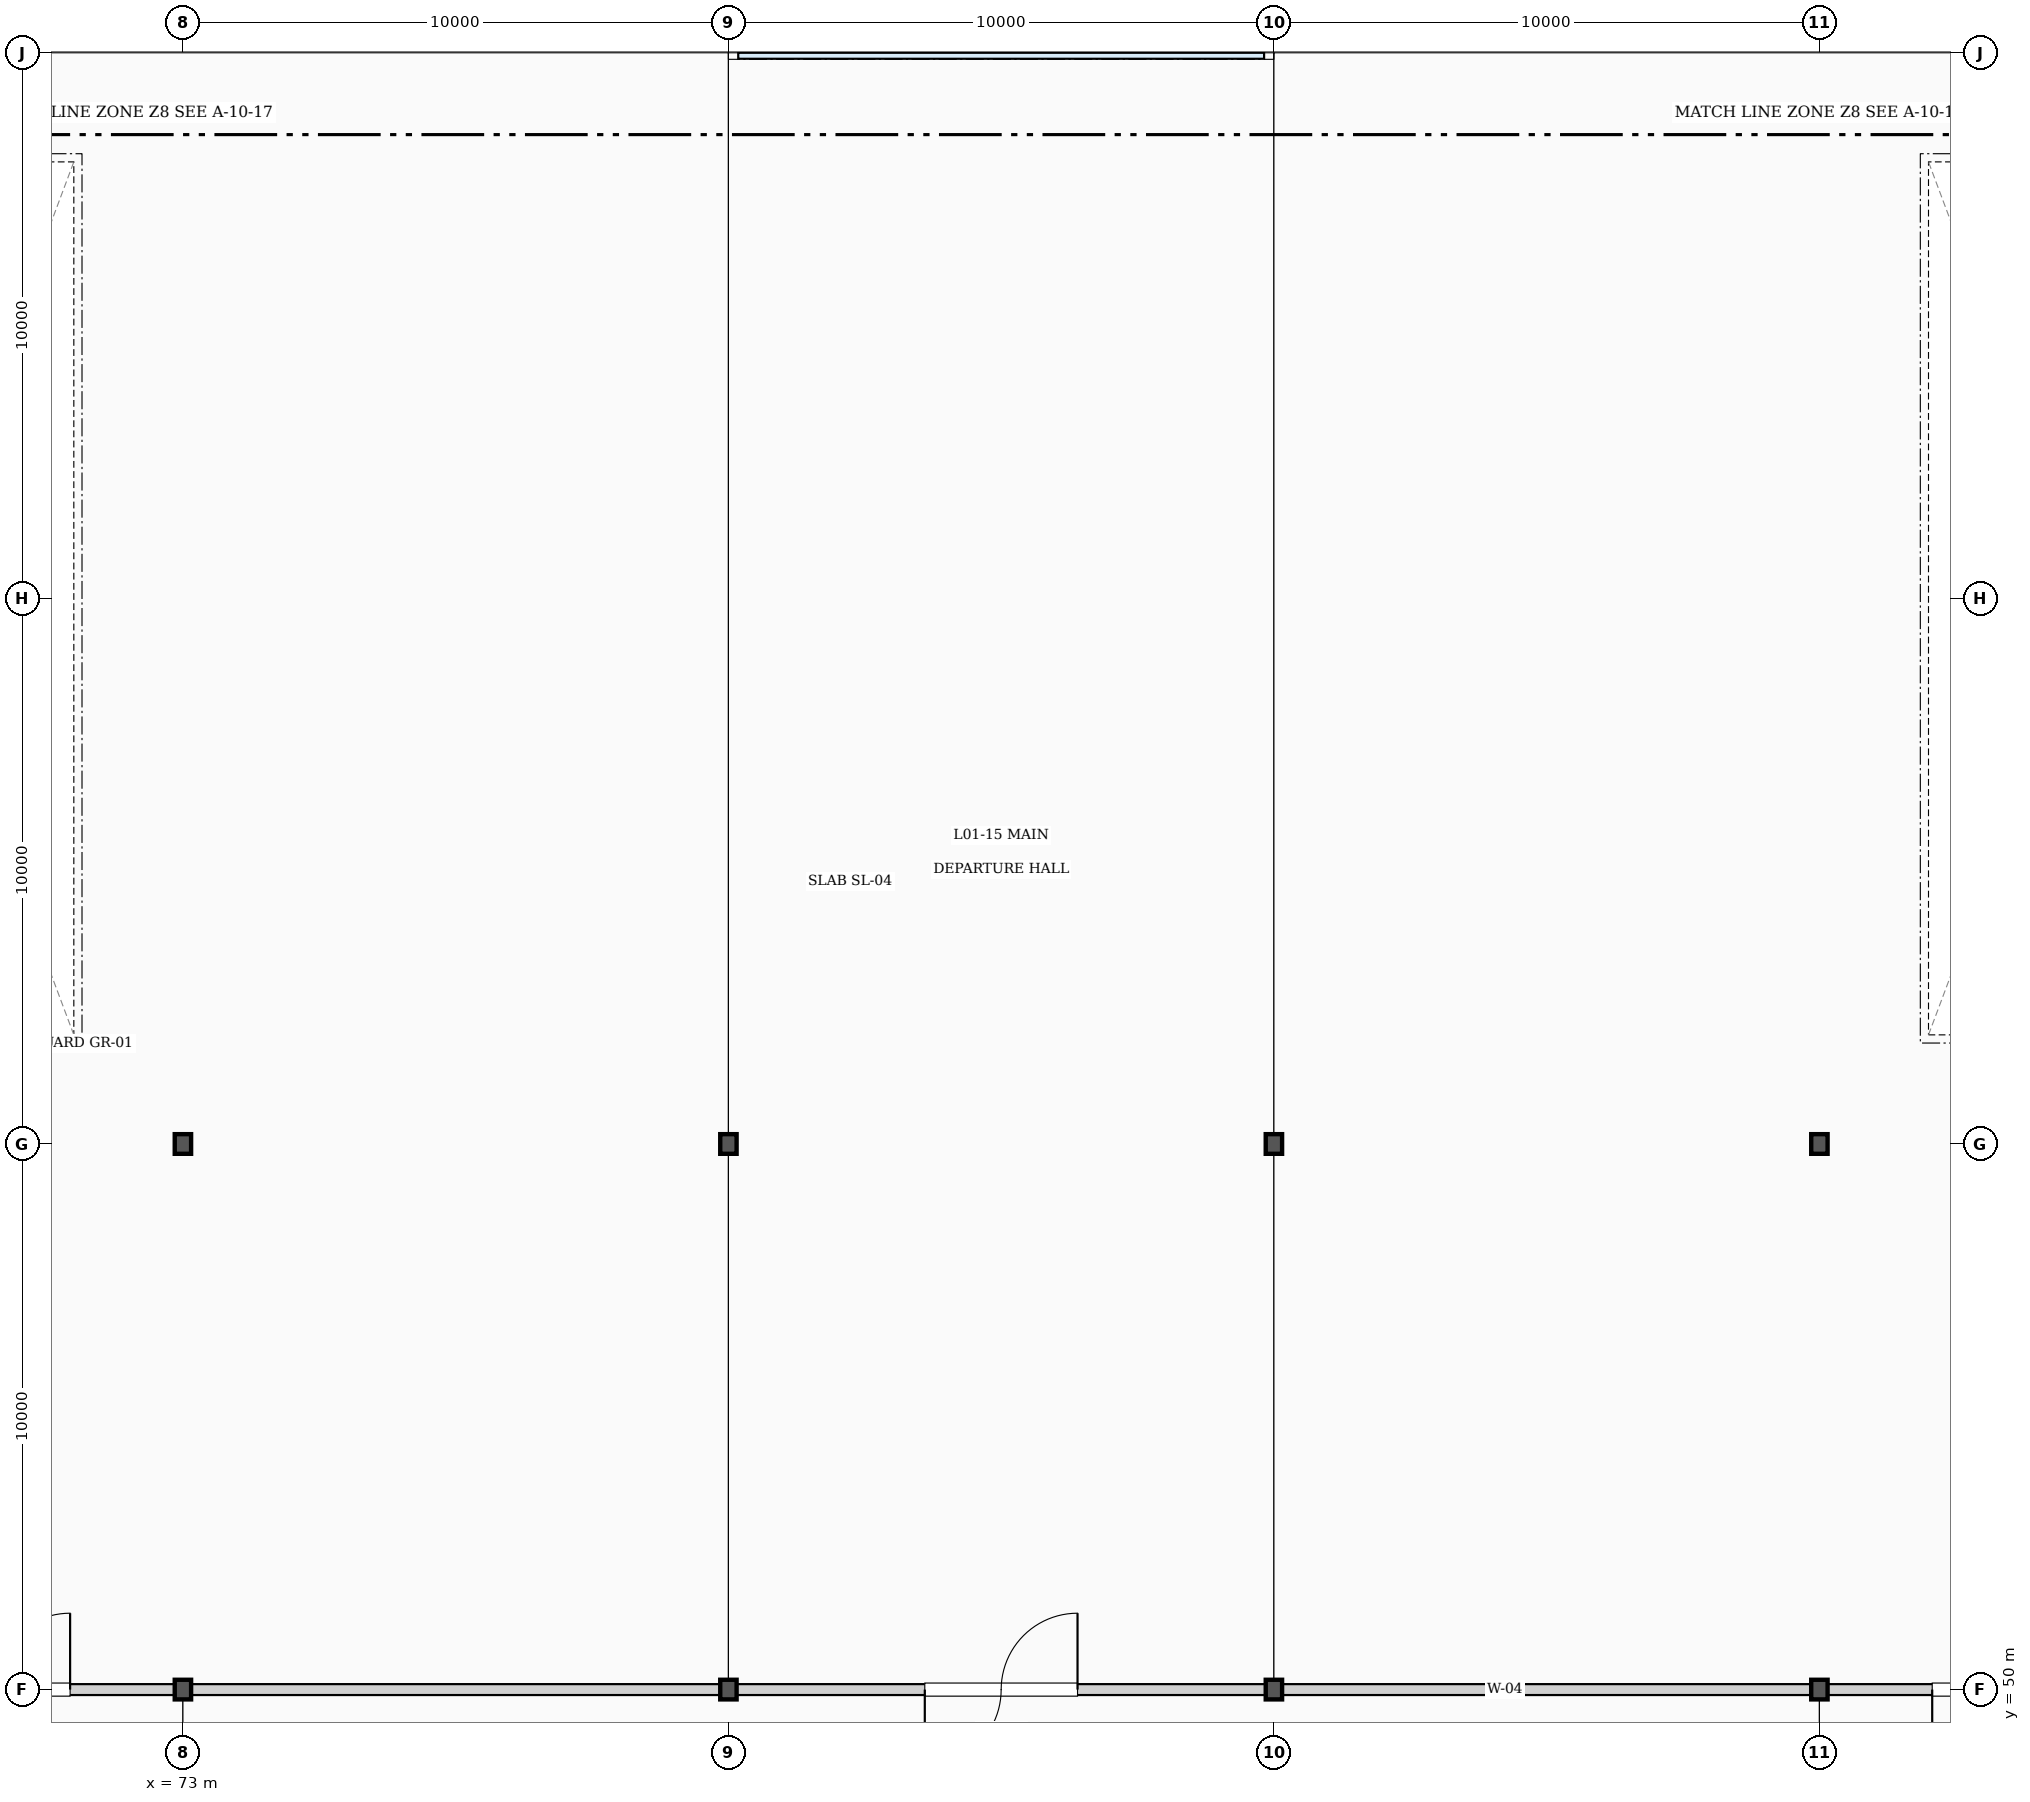
"""IFC4 building model, lengths in metres.
Left out: names, types, materials, properties, quantities, classifications, styles, units other than length and angle.
Written with IfcOpenShell. Run it as: python <this file> out.ifc"""

import sys

from ifc_helpers import new_model, si_unit, direction, frame, frame_2d, origin, origin_2d, place, context, subcontext, project, spatial, rectangle, i_section, extrude, element, fill, save


model = new_model("IFC4")
c1 = context("Model", 3, precision=1e-05, world=origin(), true_north=direction((0.0, 1.0)))
c2 = subcontext(c1, "Body", "Model", "MODEL_VIEW")
j1 = project(units=[si_unit("LENGTHUNIT", "METRE"), si_unit("PLANEANGLEUNIT", "RADIAN")], contexts=[c1])
p1 = place(None, origin())
s1 = spatial("IfcSite", under=j1, at=p1, CompositionType="ELEMENT")
p2 = place(p1, origin())
s2 = spatial("IfcBuilding", under=s1, at=p2, CompositionType="ELEMENT")
p3 = place(p2, frame((0.0, 0.0, 5.4)))
s3 = spatial("IfcBuildingStorey", under=s2, at=p3, CompositionType="ELEMENT", Elevation=5.4)
for number, where, z_axis, x_axis in (
    (1, (73.0, 50.0, 0.0), (0.0, 0.0, 1.0), (1.0, 0.0, 0.0)),
    (2, (73.0, 60.0, 0.0), (0.0, 0.0, 1.0), (1.0, 0.0, 0.0)),
    (3, (83.0, 50.0, 0.0), (0.0, 0.0, 1.0), (1.0, 0.0, 0.0)),
    (4, (83.0, 60.0, 0.0), (0.0, 0.0, 1.0), (1.0, 0.0, 0.0)),
    (5, (93.0, 50.0, 0.0), (0.0, 0.0, 1.0), (1.0, 0.0, 0.0)),
    (6, (93.0, 60.0, 0.0), (0.0, 0.0, 1.0), (1.0, 0.0, 0.0)),
    (7, (103.0, 50.0, 0.0), (0.0, 0.0, 1.0), (1.0, 0.0, 0.0)),
    (8, (103.0, 60.0, 0.0), (0.0, 0.0, 1.0), (1.0, 0.0, 0.0)),
):
    element("IfcColumn", number, at=place(p3, frame(where, z_axis=z_axis, x_axis=x_axis)), inside=s3, PredefinedType="COLUMN", context=c2, shape_type="SweptSolid", body=[
        extrude(i_section(OverallWidth=0.3, OverallDepth=0.36, WebThickness=0.012, FlangeThickness=0.022, FilletRadius=0.027, at=origin_2d()), origin(), (0.0, 0.0, 1.0), 4.8),
    ])
p4 = place(p3, frame((53.8, 50.0, 0.0), z_axis=(0.0, 0.0, 1.0), x_axis=(1.0, 0.0, 0.0)))
e9 = element("IfcWall", 9, at=p4, inside=s3, PredefinedType="PARTITIONING", context=c2, shape_type="SweptSolid", body=[
    extrude(rectangle(XDim=68.4, YDim=0.2, at=frame_2d((34.2, 0.0))), origin(), (0.0, 0.0, 1.0), 4.02),
])
p5 = place(p4, frame((14.332, 0.0, 0.0)))
e10 = element("IfcOpeningElement", 10, at=p5, cuts=e9, PredefinedType="OPENING", context=c2, shape_type="SweptSolid", body=[
    extrude(rectangle(XDim=2.8, YDim=2.7, at=frame_2d((1.4, 1.35))), frame((0.0, 0.11, 0.0), z_axis=(0.0, -1.0, 0.0), x_axis=(1.0, 0.0, 0.0)), (0.0, 0.0, 1.0), 0.22),
])
p6 = place(p4, frame((32.8, 0.0, 0.0)))
e11 = element("IfcOpeningElement", 11, at=p6, cuts=e9, PredefinedType="OPENING", context=c2, shape_type="SweptSolid", body=[
    extrude(rectangle(XDim=2.8, YDim=2.7, at=frame_2d((1.4, 1.35))), frame((0.0, 0.11, 0.0), z_axis=(0.0, -1.0, 0.0), x_axis=(1.0, 0.0, 0.0)), (0.0, 0.0, 1.0), 0.22),
])
p7 = place(p4, frame((51.268, 0.0, 0.0)))
e12 = element("IfcOpeningElement", 12, at=p7, cuts=e9, PredefinedType="OPENING", context=c2, shape_type="SweptSolid", body=[
    extrude(rectangle(XDim=2.8, YDim=2.7, at=frame_2d((1.4, 1.35))), frame((0.0, 0.11, 0.0), z_axis=(0.0, -1.0, 0.0), x_axis=(1.0, 0.0, 0.0)), (0.0, 0.0, 1.0), 0.22),
])
p8 = place(p5, origin())
e13 = element("IfcDoor", 13, at=p8, inside=s3, OperationType="DOUBLE_DOOR_SINGLE_SWING", PredefinedType="DOOR", context=c2, shape_type="SweptSolid", body=[
    extrude(rectangle(XDim=2.8, YDim=2.7, at=frame_2d((1.4, 1.35))), frame((0.0, 0.025, 0.0), z_axis=(0.0, -1.0, 0.0), x_axis=(1.0, 0.0, 0.0)), (0.0, 0.0, 1.0), 0.05),
])
fill(e10, e13)
p9 = place(p6, origin())
e14 = element("IfcDoor", 14, at=p9, inside=s3, OperationType="DOUBLE_DOOR_SINGLE_SWING", PredefinedType="DOOR", context=c2, shape_type="SweptSolid", body=[
    extrude(rectangle(XDim=2.8, YDim=2.7, at=frame_2d((1.4, 1.35))), frame((0.0, 0.025, 0.0), z_axis=(0.0, -1.0, 0.0), x_axis=(1.0, 0.0, 0.0)), (0.0, 0.0, 1.0), 0.05),
])
fill(e11, e14)
p10 = place(p7, origin())
e15 = element("IfcDoor", 15, at=p10, inside=s3, OperationType="DOUBLE_DOOR_SINGLE_SWING", PredefinedType="DOOR", context=c2, shape_type="SweptSolid", body=[
    extrude(rectangle(XDim=2.8, YDim=2.7, at=frame_2d((1.4, 1.35))), frame((0.0, 0.025, 0.0), z_axis=(0.0, -1.0, 0.0), x_axis=(1.0, 0.0, 0.0)), (0.0, 0.0, 1.0), 0.05),
])
fill(e12, e15)
save(model, sys.argv[1])
